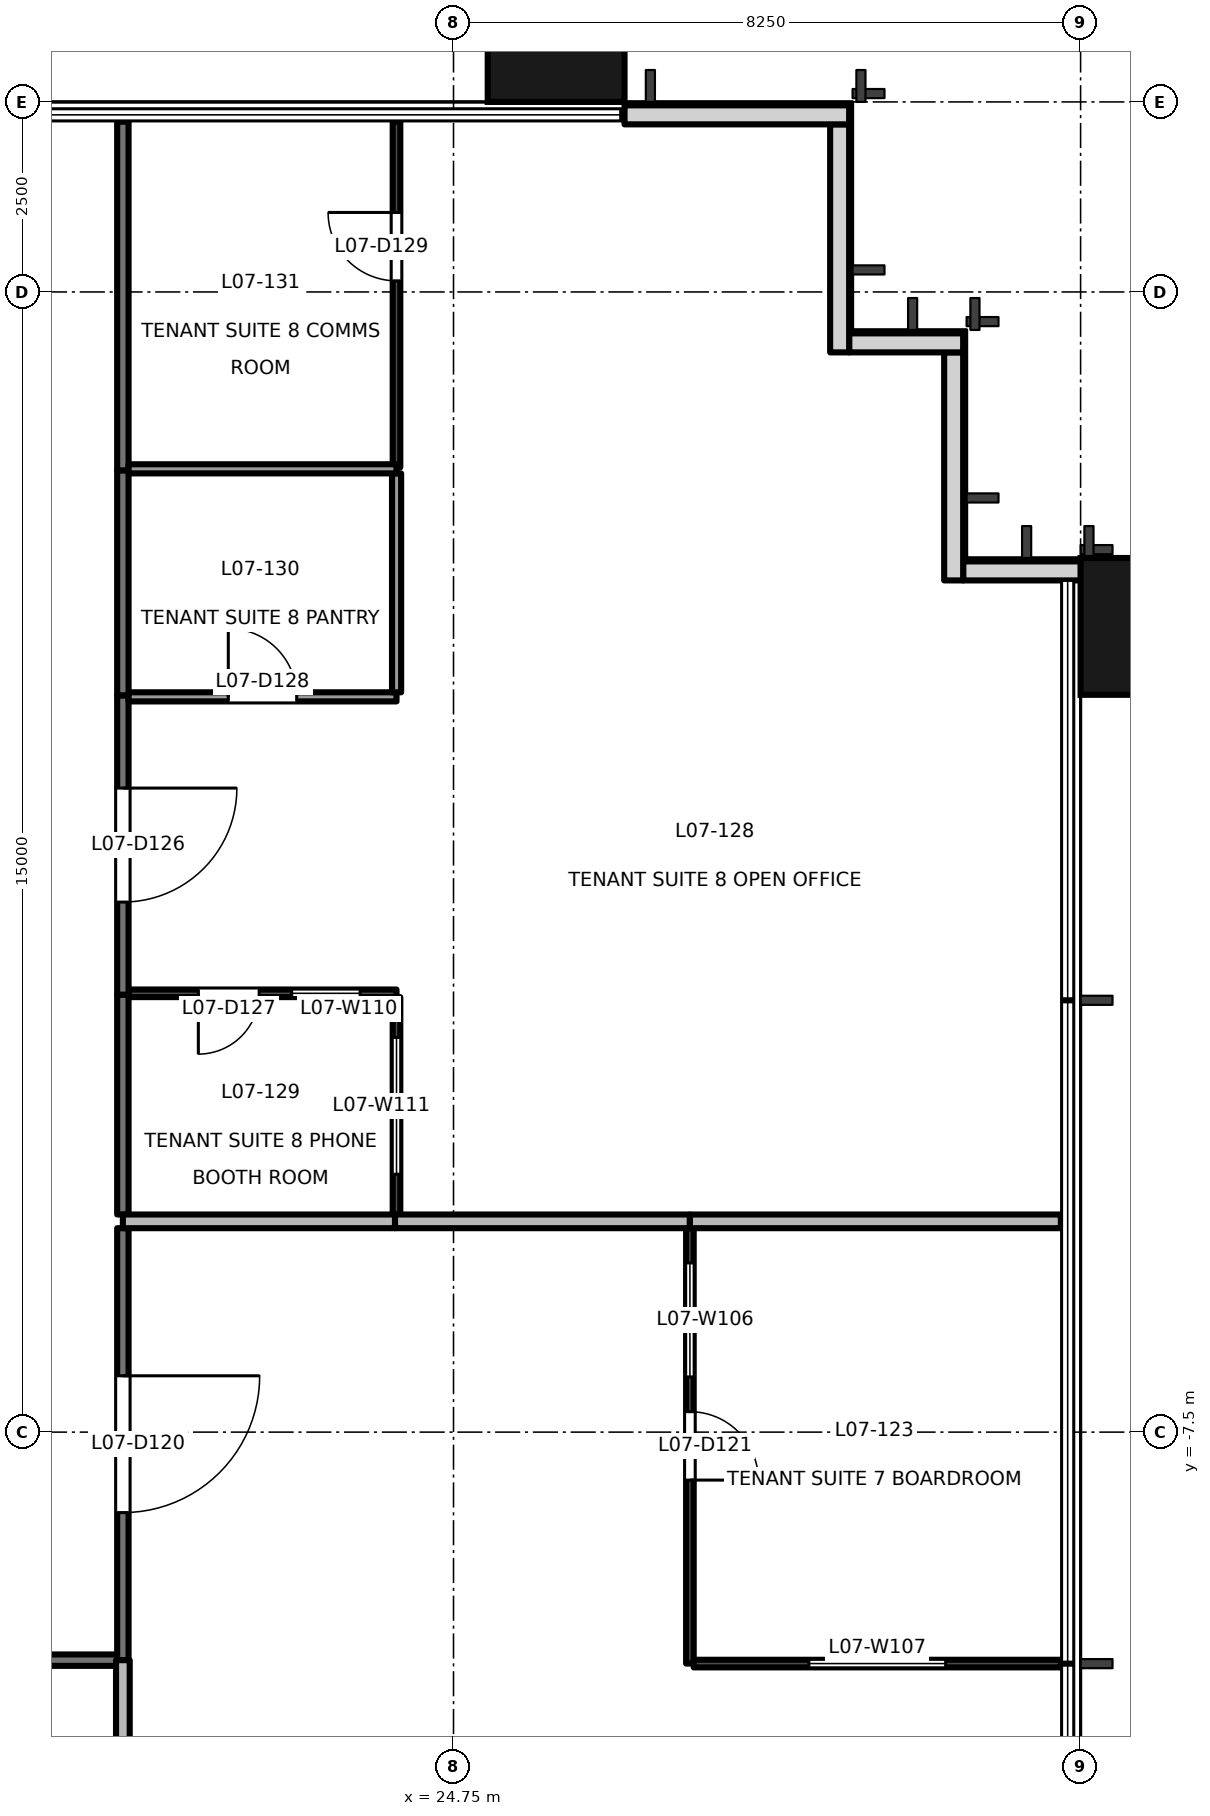
"""IFC4 building model, lengths in metres.
Left out: names, types, materials, properties, quantities, classifications, styles, units other than length and angle.
Written with IfcOpenShell. Run it as: python <this file> out.ifc"""

import sys

from ifc_helpers import new_model, si_unit, direction, frame, frame_2d, origin, origin_2d, place, context, subcontext, project, spatial, rectangle, extrude, element, fill, save


model = new_model("IFC4")
c1 = context("Model", 3, precision=1e-05, world=origin(), true_north=direction((0.0, 1.0)))
c2 = subcontext(c1, "Body", "Model", "MODEL_VIEW")
j1 = project(units=[si_unit("LENGTHUNIT", "METRE"), si_unit("PLANEANGLEUNIT", "RADIAN")], contexts=[c1])
p1 = place(None, origin())
s1 = spatial("IfcSite", under=j1, at=p1, CompositionType="ELEMENT")
p2 = place(p1, origin())
s2 = spatial("IfcBuilding", under=s1, at=p2, CompositionType="ELEMENT")
p3 = place(p2, frame((0.0, 0.0, 36.5)))
s3 = spatial("IfcBuildingStorey", under=s2, at=p3, CompositionType="ELEMENT", Elevation=36.5)
for number, where, z_axis, x_axis in (
    (1, (33.9, 3.1, -0.2), (0.0, 0.0, 1.0), (0.0, 1.0, 0.0)),
    (2, (26.1, 10.9, -0.2), (0.0, 0.0, 1.0), (1.0, 0.0, 0.0)),
):
    element("IfcColumn", number, at=place(p3, frame(where, z_axis=z_axis, x_axis=x_axis)), inside=s3, PredefinedType="COLUMN", context=c2, shape_type="SweptSolid", body=[
        extrude(rectangle(XDim=1.8, YDim=1.8, at=origin_2d()), origin(), (0.0, 0.0, 1.0), 4.1),
    ])
p4 = place(p3, frame((33.005, 3.83, 0.0), z_axis=(0.0, 0.0, 1.0), x_axis=(-1.0, 0.0, 0.0)))
e3 = element("IfcWall", 3, at=p4, inside=s3, PredefinedType="SOLIDWALL", context=c2, shape_type="SweptSolid", body=[
    extrude(rectangle(XDim=1.55, YDim=0.25, at=frame_2d((0.775, 0.0))), origin(), (0.0, 0.0, 1.0), 3.9),
])
p5 = place(p3, frame((31.33, 3.705, 0.0), z_axis=(0.0, 0.0, 1.0), x_axis=(0.0, 1.0, 0.0)))
e4 = element("IfcWall", 4, at=p5, inside=s3, PredefinedType="SOLIDWALL", context=c2, shape_type="SweptSolid", body=[
    extrude(rectangle(XDim=3.0, YDim=0.25, at=frame_2d((1.5, 0.0))), origin(), (0.0, 0.0, 1.0), 3.9),
])
p6 = place(p3, frame((31.455, 6.83, 0.0), z_axis=(0.0, 0.0, 1.0), x_axis=(-1.0, 0.0, 0.0)))
e5 = element("IfcWall", 5, at=p6, inside=s3, PredefinedType="SOLIDWALL", context=c2, shape_type="SweptSolid", body=[
    extrude(rectangle(XDim=1.5, YDim=0.25, at=frame_2d((0.75, 0.0))), origin(), (0.0, 0.0, 1.0), 3.9),
])
p7 = place(p3, frame((29.83, 6.705, 0.0), z_axis=(0.0, 0.0, 1.0), x_axis=(0.0, 1.0, 0.0)))
e6 = element("IfcWall", 6, at=p7, inside=s3, PredefinedType="SOLIDWALL", context=c2, shape_type="SweptSolid", body=[
    extrude(rectangle(XDim=3.0, YDim=0.25, at=frame_2d((1.5, 0.0))), origin(), (0.0, 0.0, 1.0), 3.9),
])
p8 = place(p3, frame((29.955, 9.83, 0.0), z_axis=(0.0, 0.0, 1.0), x_axis=(-1.0, 0.0, 0.0)))
e7 = element("IfcWall", 7, at=p8, inside=s3, PredefinedType="SOLIDWALL", context=c2, shape_type="SweptSolid", body=[
    extrude(rectangle(XDim=2.955, YDim=0.25, at=frame_2d((1.478, 0.0))), origin(), (0.0, 0.0, 1.0), 3.9),
])
p9 = place(p3, frame((20.325, -10.5, 0.0), z_axis=(0.0, 0.0, 1.0), x_axis=(-1.0, 0.0, 0.0)))
e8 = element("IfcWall", 8, at=p9, inside=s3, PredefinedType="PARTITIONING", context=c2, shape_type="SweptSolid", body=[
    extrude(rectangle(XDim=4.445, YDim=0.15, at=frame_2d((2.223, 0.0))), origin(), (0.0, 0.0, 1.0), 2.5),
])
p10 = place(p3, frame((20.4, -4.817, 0.0), z_axis=(0.0, 0.0, 1.0), x_axis=(0.0, -1.0, 0.0)))
e9 = element("IfcWall", 9, at=p10, inside=s3, PredefinedType="PARTITIONING", context=c2, shape_type="SweptSolid", body=[
    extrude(rectangle(XDim=5.683, YDim=0.15, at=frame_2d((2.842, 0.0))), origin(), (0.0, 0.0, 1.0), 3.3),
])
p11 = place(p10, frame((1.942, 0.0, 0.0)))
e10 = element("IfcOpeningElement", 10, at=p11, cuts=e9, PredefinedType="OPENING", context=c2, shape_type="SweptSolid", body=[
    extrude(rectangle(XDim=1.8, YDim=2.1, at=frame_2d((0.9, 1.05))), frame((0.0, 0.085, 0.0), z_axis=(0.0, -1.0, 0.0), x_axis=(1.0, 0.0, 0.0)), (0.0, 0.0, 1.0), 0.171),
])
p12 = place(p3, frame((20.4, 2.193, 0.0), z_axis=(0.0, 0.0, 1.0), x_axis=(0.0, -1.0, 0.0)))
e11 = element("IfcWall", 11, at=p12, inside=s3, PredefinedType="PARTITIONING", context=c2, shape_type="SweptSolid", body=[
    extrude(rectangle(XDim=3.94, YDim=0.15, at=frame_2d((1.97, 0.0))), origin(), (0.0, 0.0, 1.0), 3.3),
])
p13 = place(p12, frame((1.22, 0.0, 0.0)))
e12 = element("IfcOpeningElement", 12, at=p13, cuts=e11, PredefinedType="OPENING", context=c2, shape_type="SweptSolid", body=[
    extrude(rectangle(XDim=1.5, YDim=2.1, at=frame_2d((0.75, 1.05))), frame((0.0, 0.085, 0.0), z_axis=(0.0, -1.0, 0.0), x_axis=(1.0, 0.0, 0.0)), (0.0, 0.0, 1.0), 0.171),
])
p14 = place(p3, frame((20.4, -1.747, 0.0), z_axis=(0.0, 0.0, 1.0), x_axis=(0.0, -1.0, 0.0)))
e13 = element("IfcWall", 13, at=p14, inside=s3, PredefinedType="PARTITIONING", context=c2, shape_type="SweptSolid", body=[
    extrude(rectangle(XDim=2.89, YDim=0.15, at=frame_2d((1.445, 0.0))), origin(), (0.0, 0.0, 1.0), 3.3),
])
p15 = place(p3, frame((20.4, 5.153, 0.0), z_axis=(0.0, 0.0, 1.0), x_axis=(0.0, -1.0, 0.0)))
e14 = element("IfcWall", 14, at=p15, inside=s3, PredefinedType="PARTITIONING", context=c2, shape_type="SweptSolid", body=[
    extrude(rectangle(XDim=2.96, YDim=0.15, at=frame_2d((1.48, 0.0))), origin(), (0.0, 0.0, 1.0), 3.9),
])
p16 = place(p3, frame((20.4, 9.74, 0.0), z_axis=(0.0, 0.0, 1.0), x_axis=(0.0, -1.0, 0.0)))
e15 = element("IfcWall", 15, at=p16, inside=s3, PredefinedType="PARTITIONING", context=c2, shape_type="SweptSolid", body=[
    extrude(rectangle(XDim=4.587, YDim=0.15, at=frame_2d((2.293, 0.0))), origin(), (0.0, 0.0, 1.0), 3.9),
])
p17 = place(p3, frame((20.4, -10.5, 0.0), z_axis=(0.0, 0.0, 1.0), x_axis=(0.0, -1.0, 0.0)))
e16 = element("IfcWall", 16, at=p17, inside=s3, PredefinedType="PARTITIONING", context=c2, shape_type="SweptSolid", body=[
    extrude(rectangle(XDim=4.5, YDim=0.18, at=frame_2d((2.25, 0.0))), origin(), (0.0, 0.0, 1.0), 3.3),
])
p18 = place(p3, frame((27.86, -4.817, 0.0), z_axis=(0.0, 0.0, 1.0), x_axis=(0.0, -1.0, 0.0)))
e17 = element("IfcWall", 17, at=p18, inside=s3, PredefinedType="PARTITIONING", context=c2, shape_type="SweptSolid", body=[
    extrude(rectangle(XDim=5.728, YDim=0.1, at=frame_2d((2.864, 0.0))), origin(), (0.0, 0.0, 1.0), 3.3),
])
p19 = place(p18, frame((2.414, 0.0, 0.0)))
e18 = element("IfcOpeningElement", 18, at=p19, cuts=e17, PredefinedType="OPENING", context=c2, shape_type="SweptSolid", body=[
    extrude(rectangle(XDim=0.9, YDim=2.1, at=frame_2d((0.45, 1.05))), frame((0.0, 0.061, 0.0), z_axis=(0.0, -1.0, 0.0), x_axis=(1.0, 0.0, 0.0)), (0.0, 0.0, 1.0), 0.121),
])
p20 = place(p18, frame((0.457, 0.0, 0.9)))
e19 = element("IfcOpeningElement", 19, at=p20, cuts=e17, PredefinedType="OPENING", context=c2, shape_type="SweptSolid", body=[
    extrude(rectangle(XDim=1.5, YDim=1.2, at=frame_2d((0.75, 0.6))), frame((0.0, 0.061, 0.0), z_axis=(0.0, -1.0, 0.0), x_axis=(1.0, 0.0, 0.0)), (0.0, 0.0, 1.0), 0.121),
])
p21 = place(p3, frame((27.91, -10.545, 0.0), z_axis=(0.0, 0.0, 1.0), x_axis=(1.0, 0.0, 0.0)))
e20 = element("IfcWall", 20, at=p21, inside=s3, PredefinedType="PARTITIONING", context=c2, shape_type="SweptSolid", body=[
    extrude(rectangle(XDim=4.83, YDim=0.1, at=frame_2d((2.415, 0.0))), origin(), (0.0, 0.0, 1.0), 3.9),
])
p22 = place(p21, frame((1.515, 0.0, 0.9)))
e21 = element("IfcOpeningElement", 21, at=p22, cuts=e20, PredefinedType="OPENING", context=c2, shape_type="SweptSolid", body=[
    extrude(rectangle(XDim=1.8, YDim=1.2, at=frame_2d((0.9, 0.6))), frame((0.0, 0.061, 0.0), z_axis=(0.0, -1.0, 0.0), x_axis=(1.0, 0.0, 0.0)), (0.0, 0.0, 1.0), 0.121),
])
p23 = place(p3, frame((23.98, -4.727, 0.0), z_axis=(0.0, 0.0, 1.0), x_axis=(1.0, 0.0, 0.0)))
e22 = element("IfcWall", 22, at=p23, inside=s3, PredefinedType="PARTITIONING", context=c2, shape_type="SweptSolid", body=[
    extrude(rectangle(XDim=3.88, YDim=0.18, at=frame_2d((1.94, 0.0))), origin(), (0.0, 0.0, 1.0), 3.3),
])
p24 = place(p3, frame((20.4, -4.727, 0.0), z_axis=(0.0, 0.0, 1.0), x_axis=(1.0, 0.0, 0.0)))
e23 = element("IfcWall", 23, at=p24, inside=s3, PredefinedType="PARTITIONING", context=c2, shape_type="SweptSolid", body=[
    extrude(rectangle(XDim=3.58, YDim=0.18, at=frame_2d((1.79, 0.0))), origin(), (0.0, 0.0, 1.0), 3.3),
])
p25 = place(p3, frame((27.86, -4.727, 0.0), z_axis=(0.0, 0.0, 1.0), x_axis=(1.0, 0.0, 0.0)))
e24 = element("IfcWall", 24, at=p25, inside=s3, PredefinedType="PARTITIONING", context=c2, shape_type="SweptSolid", body=[
    extrude(rectangle(XDim=4.88, YDim=0.18, at=frame_2d((2.44, 0.0))), origin(), (0.0, 0.0, 1.0), 3.3),
])
p26 = place(p3, frame((24.0, -1.727, 0.0), z_axis=(0.0, 0.0, 1.0), x_axis=(-1.0, 0.0, 0.0)))
e25 = element("IfcWall", 25, at=p26, inside=s3, PredefinedType="PARTITIONING", context=c2, shape_type="SweptSolid", body=[
    extrude(rectangle(XDim=3.525, YDim=0.1, at=frame_2d((1.762, 0.0))), origin(), (0.0, 0.0, 1.0), 3.9),
])
p27 = place(p26, frame((1.807, 0.0, 0.0)))
e26 = element("IfcOpeningElement", 26, at=p27, cuts=e25, PredefinedType="OPENING", context=c2, shape_type="SweptSolid", body=[
    extrude(rectangle(XDim=0.8, YDim=2.1, at=frame_2d((0.4, 1.05))), frame((0.0, 0.061, 0.0), z_axis=(0.0, -1.0, 0.0), x_axis=(1.0, 0.0, 0.0)), (0.0, 0.0, 1.0), 0.121),
])
p28 = place(p26, frame((0.479, 0.0, 0.9)))
e27 = element("IfcOpeningElement", 27, at=p28, cuts=e25, PredefinedType="OPENING", context=c2, shape_type="SweptSolid", body=[
    extrude(rectangle(XDim=0.9, YDim=1.2, at=frame_2d((0.45, 0.6))), frame((0.0, 0.061, 0.0), z_axis=(0.0, -1.0, 0.0), x_axis=(1.0, 0.0, 0.0)), (0.0, 0.0, 1.0), 0.121),
])
p29 = place(p3, frame((24.0, -4.637, 0.0), z_axis=(0.0, 0.0, 1.0), x_axis=(0.0, 1.0, 0.0)))
e28 = element("IfcWall", 28, at=p29, inside=s3, PredefinedType="PARTITIONING", context=c2, shape_type="SweptSolid", body=[
    extrude(rectangle(XDim=2.86, YDim=0.1, at=frame_2d((1.43, 0.0))), origin(), (0.0, 0.0, 1.0), 3.3),
])
p30 = place(p29, frame((0.53, 0.0, 0.9)))
e29 = element("IfcOpeningElement", 29, at=p30, cuts=e28, PredefinedType="OPENING", context=c2, shape_type="SweptSolid", body=[
    extrude(rectangle(XDim=1.8, YDim=1.2, at=frame_2d((0.9, 0.6))), frame((0.0, 0.061, 0.0), z_axis=(0.0, -1.0, 0.0), x_axis=(1.0, 0.0, 0.0)), (0.0, 0.0, 1.0), 0.121),
])
p31 = place(p3, frame((20.475, 2.173, 0.0), z_axis=(0.0, 0.0, 1.0), x_axis=(1.0, 0.0, 0.0)))
e30 = element("IfcWall", 30, at=p31, inside=s3, PredefinedType="PARTITIONING", context=c2, shape_type="SweptSolid", body=[
    extrude(rectangle(XDim=3.525, YDim=0.12, at=frame_2d((1.762, 0.0))), origin(), (0.0, 0.0, 1.0), 3.9),
])
p32 = place(p31, frame((1.312, 0.0, 0.0)))
e31 = element("IfcOpeningElement", 31, at=p32, cuts=e30, PredefinedType="OPENING", context=c2, shape_type="SweptSolid", body=[
    extrude(rectangle(XDim=0.9, YDim=2.1, at=frame_2d((0.45, 1.05))), frame((0.0, 0.071, 0.0), z_axis=(0.0, -1.0, 0.0), x_axis=(1.0, 0.0, 0.0)), (0.0, 0.0, 1.0), 0.141),
])
p33 = place(p3, frame((24.001, 2.233, 0.0), z_axis=(0.0, 0.0, 1.0), x_axis=(0.0, 1.0, 0.0)))
e32 = element("IfcWall", 32, at=p33, inside=s3, PredefinedType="PARTITIONING", context=c2, shape_type="SweptSolid", body=[
    extrude(rectangle(XDim=2.88, YDim=0.12, at=frame_2d((1.44, 0.0))), origin(), (0.0, 0.0, 1.0), 3.9),
])
p34 = place(p3, frame((24.0, 5.193, 0.0), z_axis=(0.0, 0.0, 1.0), x_axis=(0.0, 1.0, 0.0)))
e33 = element("IfcWall", 33, at=p34, inside=s3, PredefinedType="PARTITIONING", context=c2, shape_type="SweptSolid", body=[
    extrude(rectangle(XDim=4.547, YDim=0.1, at=frame_2d((2.273, 0.0))), origin(), (0.0, 0.0, 1.0), 3.9),
])
p35 = place(p34, frame((2.453, 0.0, 0.0)))
e34 = element("IfcOpeningElement", 34, at=p35, cuts=e33, PredefinedType="OPENING", context=c2, shape_type="SweptSolid", body=[
    extrude(rectangle(XDim=0.9, YDim=2.1, at=frame_2d((0.45, 1.05))), frame((0.0, 0.061, 0.0), z_axis=(0.0, -1.0, 0.0), x_axis=(1.0, 0.0, 0.0)), (0.0, 0.0, 1.0), 0.121),
])
p36 = place(p3, frame((20.475, 5.173, 0.0), z_axis=(0.0, 0.0, 1.0), x_axis=(1.0, 0.0, 0.0)))
e35 = element("IfcWall", 35, at=p36, inside=s3, PredefinedType="PARTITIONING", context=c2, shape_type="SweptSolid", body=[
    extrude(rectangle(XDim=3.525, YDim=0.12, at=frame_2d((1.762, 0.0))), origin(), (0.0, 0.0, 1.0), 3.9),
])
p37 = place(p11, origin())
e36 = element("IfcDoor", 36, at=p37, inside=s3, OperationType="DOUBLE_DOOR_SINGLE_SWING", PredefinedType="DOOR", context=c2, shape_type="SweptSolid", body=[
    extrude(rectangle(XDim=1.8, YDim=2.1, at=frame_2d((0.9, 1.05))), frame((0.0, 0.025, 0.0), z_axis=(0.0, -1.0, 0.0), x_axis=(1.0, 0.0, 0.0)), (0.0, 0.0, 1.0), 0.05),
])
fill(e10, e36)
p38 = place(p19, origin())
e37 = element("IfcDoor", 37, at=p38, inside=s3, OperationType="SINGLE_SWING_RIGHT", PredefinedType="DOOR", context=c2, shape_type="SweptSolid", body=[
    extrude(rectangle(XDim=0.9, YDim=2.1, at=frame_2d((0.45, 1.05))), frame((0.0, 0.025, 0.0), z_axis=(0.0, -1.0, 0.0), x_axis=(1.0, 0.0, 0.0)), (0.0, 0.0, 1.0), 0.05),
])
fill(e18, e37)
p39 = place(p13, origin())
e38 = element("IfcDoor", 38, at=p39, inside=s3, OperationType="DOUBLE_DOOR_SINGLE_SWING", PredefinedType="DOOR", context=c2, shape_type="SweptSolid", body=[
    extrude(rectangle(XDim=1.5, YDim=2.1, at=frame_2d((0.75, 1.05))), frame((0.0, 0.025, 0.0), z_axis=(0.0, -1.0, 0.0), x_axis=(1.0, 0.0, 0.0)), (0.0, 0.0, 1.0), 0.05),
])
fill(e12, e38)
p40 = place(p27, origin())
e39 = element("IfcDoor", 39, at=p40, inside=s3, OperationType="SINGLE_SWING_RIGHT", PredefinedType="DOOR", context=c2, shape_type="SweptSolid", body=[
    extrude(rectangle(XDim=0.8, YDim=2.1, at=frame_2d((0.4, 1.05))), frame((0.0, 0.025, 0.0), z_axis=(0.0, -1.0, 0.0), x_axis=(1.0, 0.0, 0.0)), (0.0, 0.0, 1.0), 0.05),
])
fill(e26, e39)
p41 = place(p32, origin())
e40 = element("IfcDoor", 40, at=p41, inside=s3, OperationType="SINGLE_SWING_LEFT", PredefinedType="DOOR", context=c2, shape_type="SweptSolid", body=[
    extrude(rectangle(XDim=0.9, YDim=2.1, at=frame_2d((0.45, 1.05))), frame((0.0, 0.025, 0.0), z_axis=(0.0, -1.0, 0.0), x_axis=(1.0, 0.0, 0.0)), (0.0, 0.0, 1.0), 0.05),
])
fill(e31, e40)
p42 = place(p35, origin())
e41 = element("IfcDoor", 41, at=p42, inside=s3, OperationType="SINGLE_SWING_RIGHT", PredefinedType="DOOR", context=c2, shape_type="SweptSolid", body=[
    extrude(rectangle(XDim=0.9, YDim=2.1, at=frame_2d((0.45, 1.05))), frame((0.0, 0.025, 0.0), z_axis=(0.0, -1.0, 0.0), x_axis=(1.0, 0.0, 0.0)), (0.0, 0.0, 1.0), 0.05),
])
fill(e34, e41)
p43 = place(p20, origin())
e42 = element("IfcWindow", 42, at=p43, inside=s3, PartitioningType="SINGLE_PANEL", PredefinedType="WINDOW", context=c2, shape_type="SweptSolid", body=[
    extrude(rectangle(XDim=1.5, YDim=1.2, at=frame_2d((0.75, 0.6))), frame((0.0, 0.03, 0.0), z_axis=(0.0, -1.0, 0.0), x_axis=(1.0, 0.0, 0.0)), (0.0, 0.0, 1.0), 0.06),
])
fill(e19, e42)
p44 = place(p22, origin())
e43 = element("IfcWindow", 43, at=p44, inside=s3, PartitioningType="SINGLE_PANEL", PredefinedType="WINDOW", context=c2, shape_type="SweptSolid", body=[
    extrude(rectangle(XDim=1.8, YDim=1.2, at=frame_2d((0.9, 0.6))), frame((0.0, 0.03, 0.0), z_axis=(0.0, -1.0, 0.0), x_axis=(1.0, 0.0, 0.0)), (0.0, 0.0, 1.0), 0.06),
])
fill(e21, e43)
p45 = place(p28, origin())
e44 = element("IfcWindow", 44, at=p45, inside=s3, PartitioningType="SINGLE_PANEL", PredefinedType="WINDOW", context=c2, shape_type="SweptSolid", body=[
    extrude(rectangle(XDim=0.9, YDim=1.2, at=frame_2d((0.45, 0.6))), frame((0.0, 0.03, 0.0), z_axis=(0.0, -1.0, 0.0), x_axis=(1.0, 0.0, 0.0)), (0.0, 0.0, 1.0), 0.06),
])
fill(e27, e44)
p46 = place(p30, origin())
e45 = element("IfcWindow", 45, at=p46, inside=s3, PartitioningType="SINGLE_PANEL", PredefinedType="WINDOW", context=c2, shape_type="SweptSolid", body=[
    extrude(rectangle(XDim=1.8, YDim=1.2, at=frame_2d((0.9, 0.6))), frame((0.0, 0.03, 0.0), z_axis=(0.0, -1.0, 0.0), x_axis=(1.0, 0.0, 0.0)), (0.0, 0.0, 1.0), 0.06),
])
fill(e29, e45)
save(model, sys.argv[1])
